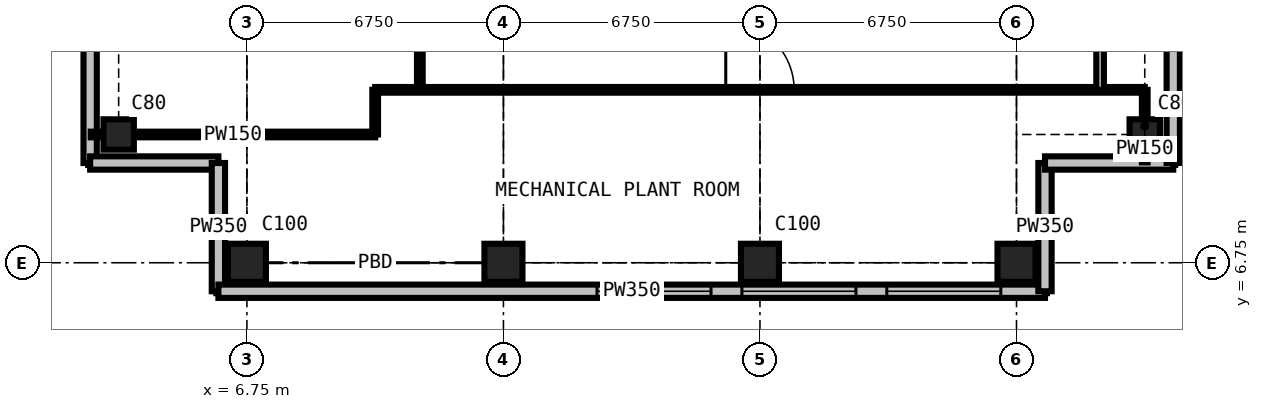
"""IFC4 building model, lengths in metres.
Left out: names, types, materials, properties, quantities, classifications, styles, units other than length and angle.
Written with IfcOpenShell. Run it as: python <this file> out.ifc"""

import sys

from ifc_helpers import new_model, si_unit, direction, frame, frame_2d, origin, origin_2d, place, context, subcontext, project, spatial, rectangle, extrude, element, fill, save


model = new_model("IFC4")
c1 = context("Model", 3, precision=1e-05, world=origin(), true_north=direction((0.0, 1.0)))
c2 = subcontext(c1, "Body", "Model", "MODEL_VIEW")
j1 = project(units=[si_unit("LENGTHUNIT", "METRE"), si_unit("PLANEANGLEUNIT", "RADIAN")], contexts=[c1])
p1 = place(None, origin())
s1 = spatial("IfcSite", under=j1, at=p1, CompositionType="ELEMENT")
p2 = place(p1, origin())
s2 = spatial("IfcBuilding", under=s1, at=p2, CompositionType="ELEMENT")
p3 = place(p2, frame((0.0, 0.0, 254.7)))
s3 = spatial("IfcBuildingStorey", under=s2, at=p3, CompositionType="ELEMENT", Elevation=254.7)
p4 = place(p3, frame((3.375, 10.125, 0.0), z_axis=(0.0, 0.0, 1.0), x_axis=(1.0, 0.0, 0.0)))
e1 = element("IfcColumn", 1, at=p4, inside=s3, PredefinedType="COLUMN", context=c2, shape_type="SweptSolid", body=[
    extrude(rectangle(XDim=0.8, YDim=0.8, at=origin_2d()), origin(), (0.0, 0.0, 1.0), 4.5),
])
for number, where, z_axis, x_axis in (
    (2, (6.75, 6.75, 0.0), (0.0, 0.0, 1.0), (1.0, 0.0, 0.0)),
    (3, (13.5, 6.75, 0.0), (0.0, 0.0, 1.0), (1.0, 0.0, 0.0)),
    (4, (20.25, 6.75, 0.0), (0.0, 0.0, 1.0), (1.0, 0.0, 0.0)),
    (5, (27.0, 6.75, 0.0), (0.0, 0.0, 1.0), (1.0, 0.0, 0.0)),
):
    element("IfcColumn", number, at=place(p3, frame(where, z_axis=z_axis, x_axis=x_axis)), inside=s3, PredefinedType="COLUMN", context=c2, shape_type="SweptSolid", body=[
        extrude(rectangle(XDim=1.0, YDim=1.0, at=origin_2d()), origin(), (0.0, 0.0, 1.0), 4.5),
    ])
p5 = place(p3, frame((30.375, 10.125, 0.0), z_axis=(0.0, 0.0, 1.0), x_axis=(1.0, 0.0, 0.0)))
e6 = element("IfcColumn", 6, at=p5, inside=s3, PredefinedType="COLUMN", context=c2, shape_type="SweptSolid", body=[
    extrude(rectangle(XDim=0.8, YDim=0.8, at=origin_2d()), origin(), (0.0, 0.0, 1.0), 4.5),
])
for number, where, z_axis, x_axis in (
    (7, (2.625, 12.75, 0.0), (0.0, 0.0, 1.0), (0.0, -1.0, 0.0)),
    (8, (2.625, 9.375, 0.0), (0.0, 0.0, 1.0), (1.0, 0.0, 0.0)),
    (9, (6.0, 9.375, 0.0), (0.0, 0.0, 1.0), (0.0, -1.0, 0.0)),
):
    element("IfcWall", number, at=place(p3, frame(where, z_axis=z_axis, x_axis=x_axis)), inside=s3, PredefinedType="SOLIDWALL", context=c2, shape_type="SweptSolid", body=[
        extrude(rectangle(XDim=3.375, YDim=0.35, at=frame_2d((1.688, 0.0))), origin(), (0.0, 0.0, 1.0), 5.6),
    ])
p6 = place(p3, frame((6.0, 6.0, 0.0), z_axis=(0.0, 0.0, 1.0), x_axis=(1.0, 0.0, 0.0)))
e10 = element("IfcWall", 10, at=p6, inside=s3, PredefinedType="SOLIDWALL", context=c2, shape_type="SweptSolid", body=[
    extrude(rectangle(XDim=21.75, YDim=0.35, at=frame_2d((10.875, 0.0))), origin(), (0.0, 0.0, 1.0), 5.6),
])
p7 = place(p6, frame((9.962, 0.0, 0.9)))
e11 = element("IfcOpeningElement", 11, at=p7, cuts=e10, PredefinedType="OPENING", context=c2, shape_type="SweptSolid", body=[
    extrude(rectangle(XDim=3.0, YDim=3.0, at=frame_2d((1.5, 1.5))), frame((0.0, 0.185, 0.0), z_axis=(0.0, -1.0, 0.0), x_axis=(1.0, 0.0, 0.0)), (0.0, 0.0, 1.0), 0.37),
])
p8 = place(p6, frame((13.775, 0.0, 0.9)))
e12 = element("IfcOpeningElement", 12, at=p8, cuts=e10, PredefinedType="OPENING", context=c2, shape_type="SweptSolid", body=[
    extrude(rectangle(XDim=3.0, YDim=3.0, at=frame_2d((1.5, 1.5))), frame((0.0, 0.185, 0.0), z_axis=(0.0, -1.0, 0.0), x_axis=(1.0, 0.0, 0.0)), (0.0, 0.0, 1.0), 0.37),
])
p9 = place(p6, frame((17.587, 0.0, 0.9)))
e13 = element("IfcOpeningElement", 13, at=p9, cuts=e10, PredefinedType="OPENING", context=c2, shape_type="SweptSolid", body=[
    extrude(rectangle(XDim=3.0, YDim=3.0, at=frame_2d((1.5, 1.5))), frame((0.0, 0.185, 0.0), z_axis=(0.0, -1.0, 0.0), x_axis=(1.0, 0.0, 0.0)), (0.0, 0.0, 1.0), 0.37),
])
for number, where, z_axis, x_axis in (
    (14, (27.75, 6.0, 0.0), (0.0, 0.0, 1.0), (0.0, 1.0, 0.0)),
    (15, (27.75, 9.375, 0.0), (0.0, 0.0, 1.0), (1.0, 0.0, 0.0)),
    (16, (31.125, 9.375, 0.0), (0.0, 0.0, 1.0), (0.0, 1.0, 0.0)),
):
    element("IfcWall", number, at=place(p3, frame(where, z_axis=z_axis, x_axis=x_axis)), inside=s3, PredefinedType="SOLIDWALL", context=c2, shape_type="SweptSolid", body=[
        extrude(rectangle(XDim=3.375, YDim=0.35, at=frame_2d((1.688, 0.0))), origin(), (0.0, 0.0, 1.0), 5.6),
    ])
p10 = place(p3, frame((2.641, 10.125, 0.0), z_axis=(0.0, 0.0, 1.0), x_axis=(1.0, 0.0, 0.0)))
e17 = element("IfcWall", 17, at=p10, inside=s3, PredefinedType="PARTITIONING", context=c2, shape_type="SweptSolid", body=[
    extrude(rectangle(XDim=7.484, YDim=0.15, at=frame_2d((3.742, 0.0))), origin(), (0.0, 0.0, 1.0), 3.652),
])
p11 = place(p3, frame((10.125, 10.125, 0.0), z_axis=(0.0, 0.0, 1.0), x_axis=(0.0, 1.0, 0.0)))
e18 = element("IfcWall", 18, at=p11, inside=s3, PredefinedType="PARTITIONING", context=c2, shape_type="SweptSolid", body=[
    extrude(rectangle(XDim=1.175, YDim=0.15, at=frame_2d((0.587, 0.0))), origin(), (0.0, 0.0, 1.0), 4.15),
])
p12 = place(p3, frame((10.125, 11.3, 0.0), z_axis=(0.0, 0.0, 1.0), x_axis=(1.0, 0.0, 0.0)))
e19 = element("IfcWall", 19, at=p12, inside=s3, PredefinedType="PARTITIONING", context=c2, shape_type="SweptSolid", body=[
    extrude(rectangle(XDim=20.25, YDim=0.15, at=frame_2d((10.125, 0.0))), origin(), (0.0, 0.0, 1.0), 4.15),
])
p13 = place(p12, frame((9.225, 0.0, 0.0)))
e20 = element("IfcOpeningElement", 20, at=p13, cuts=e19, PredefinedType="OPENING", context=c2, shape_type="SweptSolid", body=[
    extrude(rectangle(XDim=1.8, YDim=2.4, at=frame_2d((0.9, 1.2))), frame((0.0, 0.085, 0.0), z_axis=(0.0, -1.0, 0.0), x_axis=(1.0, 0.0, 0.0)), (0.0, 0.0, 1.0), 0.17),
])
p14 = place(p3, frame((11.3, 11.3, 0.0), z_axis=(0.0, 0.0, 1.0), x_axis=(0.0, 1.0, 0.0)))
e21 = element("IfcWall", 21, at=p14, inside=s3, PredefinedType="PARTITIONING", context=c2, shape_type="SweptSolid", body=[
    extrude(rectangle(XDim=19.075, YDim=0.15, at=frame_2d((9.538, 0.0))), origin(), (0.0, 0.0, 1.0), 4.15),
])
p15 = place(p14, frame((7.25, 0.0, 0.0)))
e22 = element("IfcOpeningElement", 22, at=p15, cuts=e21, PredefinedType="OPENING", context=c2, shape_type="SweptSolid", body=[
    extrude(rectangle(XDim=1.8, YDim=2.4, at=frame_2d((0.9, 1.2))), frame((0.0, 0.085, 0.0), z_axis=(0.0, -1.0, 0.0), x_axis=(1.0, 0.0, 0.0)), (0.0, 0.0, 1.0), 0.17),
])
p16 = place(p3, frame((29.2, 11.3, 0.0), z_axis=(0.0, 0.0, 1.0), x_axis=(0.0, 1.0, 0.0)))
e23 = element("IfcWall", 23, at=p16, inside=s3, PredefinedType="PARTITIONING", context=c2, shape_type="SweptSolid", body=[
    extrude(rectangle(XDim=17.9, YDim=0.2, at=frame_2d((8.95, 0.0))), origin(), (0.0, 0.0, 1.0), 4.15),
])
p17 = place(p16, frame((8.05, 0.0, 0.0)))
e24 = element("IfcOpeningElement", 24, at=p17, cuts=e23, PredefinedType="OPENING", context=c2, shape_type="SweptSolid", body=[
    extrude(rectangle(XDim=1.8, YDim=2.4, at=frame_2d((0.9, 1.2))), frame((0.0, 0.11, 0.0), z_axis=(0.0, -1.0, 0.0), x_axis=(1.0, 0.0, 0.0)), (0.0, 0.0, 1.0), 0.22),
])
p18 = place(p3, frame((30.375, 9.391, 0.0), z_axis=(0.0, 0.0, 1.0), x_axis=(0.0, 1.0, 0.0)))
e25 = element("IfcWall", 25, at=p18, inside=s3, PredefinedType="PARTITIONING", context=c2, shape_type="SweptSolid", body=[
    extrude(rectangle(XDim=1.909, YDim=0.15, at=frame_2d((0.955, 0.0))), origin(), (0.0, 0.0, 1.0), 3.652),
])
p19 = place(p7, origin())
e26 = element("IfcWindow", 26, at=p19, inside=s3, PartitioningType="SINGLE_PANEL", PredefinedType="WINDOW", context=c2, shape_type="SweptSolid", body=[
    extrude(rectangle(XDim=3.0, YDim=3.0, at=frame_2d((1.5, 1.5))), frame((0.0, 0.03, 0.0), z_axis=(0.0, -1.0, 0.0), x_axis=(1.0, 0.0, 0.0)), (0.0, 0.0, 1.0), 0.06),
])
fill(e11, e26)
p20 = place(p8, origin())
e27 = element("IfcWindow", 27, at=p20, inside=s3, PartitioningType="SINGLE_PANEL", PredefinedType="WINDOW", context=c2, shape_type="SweptSolid", body=[
    extrude(rectangle(XDim=3.0, YDim=3.0, at=frame_2d((1.5, 1.5))), frame((0.0, 0.03, 0.0), z_axis=(0.0, -1.0, 0.0), x_axis=(1.0, 0.0, 0.0)), (0.0, 0.0, 1.0), 0.06),
])
fill(e12, e27)
p21 = place(p9, origin())
e28 = element("IfcWindow", 28, at=p21, inside=s3, PartitioningType="SINGLE_PANEL", PredefinedType="WINDOW", context=c2, shape_type="SweptSolid", body=[
    extrude(rectangle(XDim=3.0, YDim=3.0, at=frame_2d((1.5, 1.5))), frame((0.0, 0.03, 0.0), z_axis=(0.0, -1.0, 0.0), x_axis=(1.0, 0.0, 0.0)), (0.0, 0.0, 1.0), 0.06),
])
fill(e13, e28)
p22 = place(p13, origin())
e29 = element("IfcDoor", 29, at=p22, inside=s3, OperationType="DOUBLE_DOOR_SINGLE_SWING", PredefinedType="DOOR", context=c2, shape_type="SweptSolid", body=[
    extrude(rectangle(XDim=1.8, YDim=2.4, at=frame_2d((0.9, 1.2))), frame((0.0, 0.025, 0.0), z_axis=(0.0, -1.0, 0.0), x_axis=(1.0, 0.0, 0.0)), (0.0, 0.0, 1.0), 0.05),
])
fill(e20, e29)
save(model, sys.argv[1])
